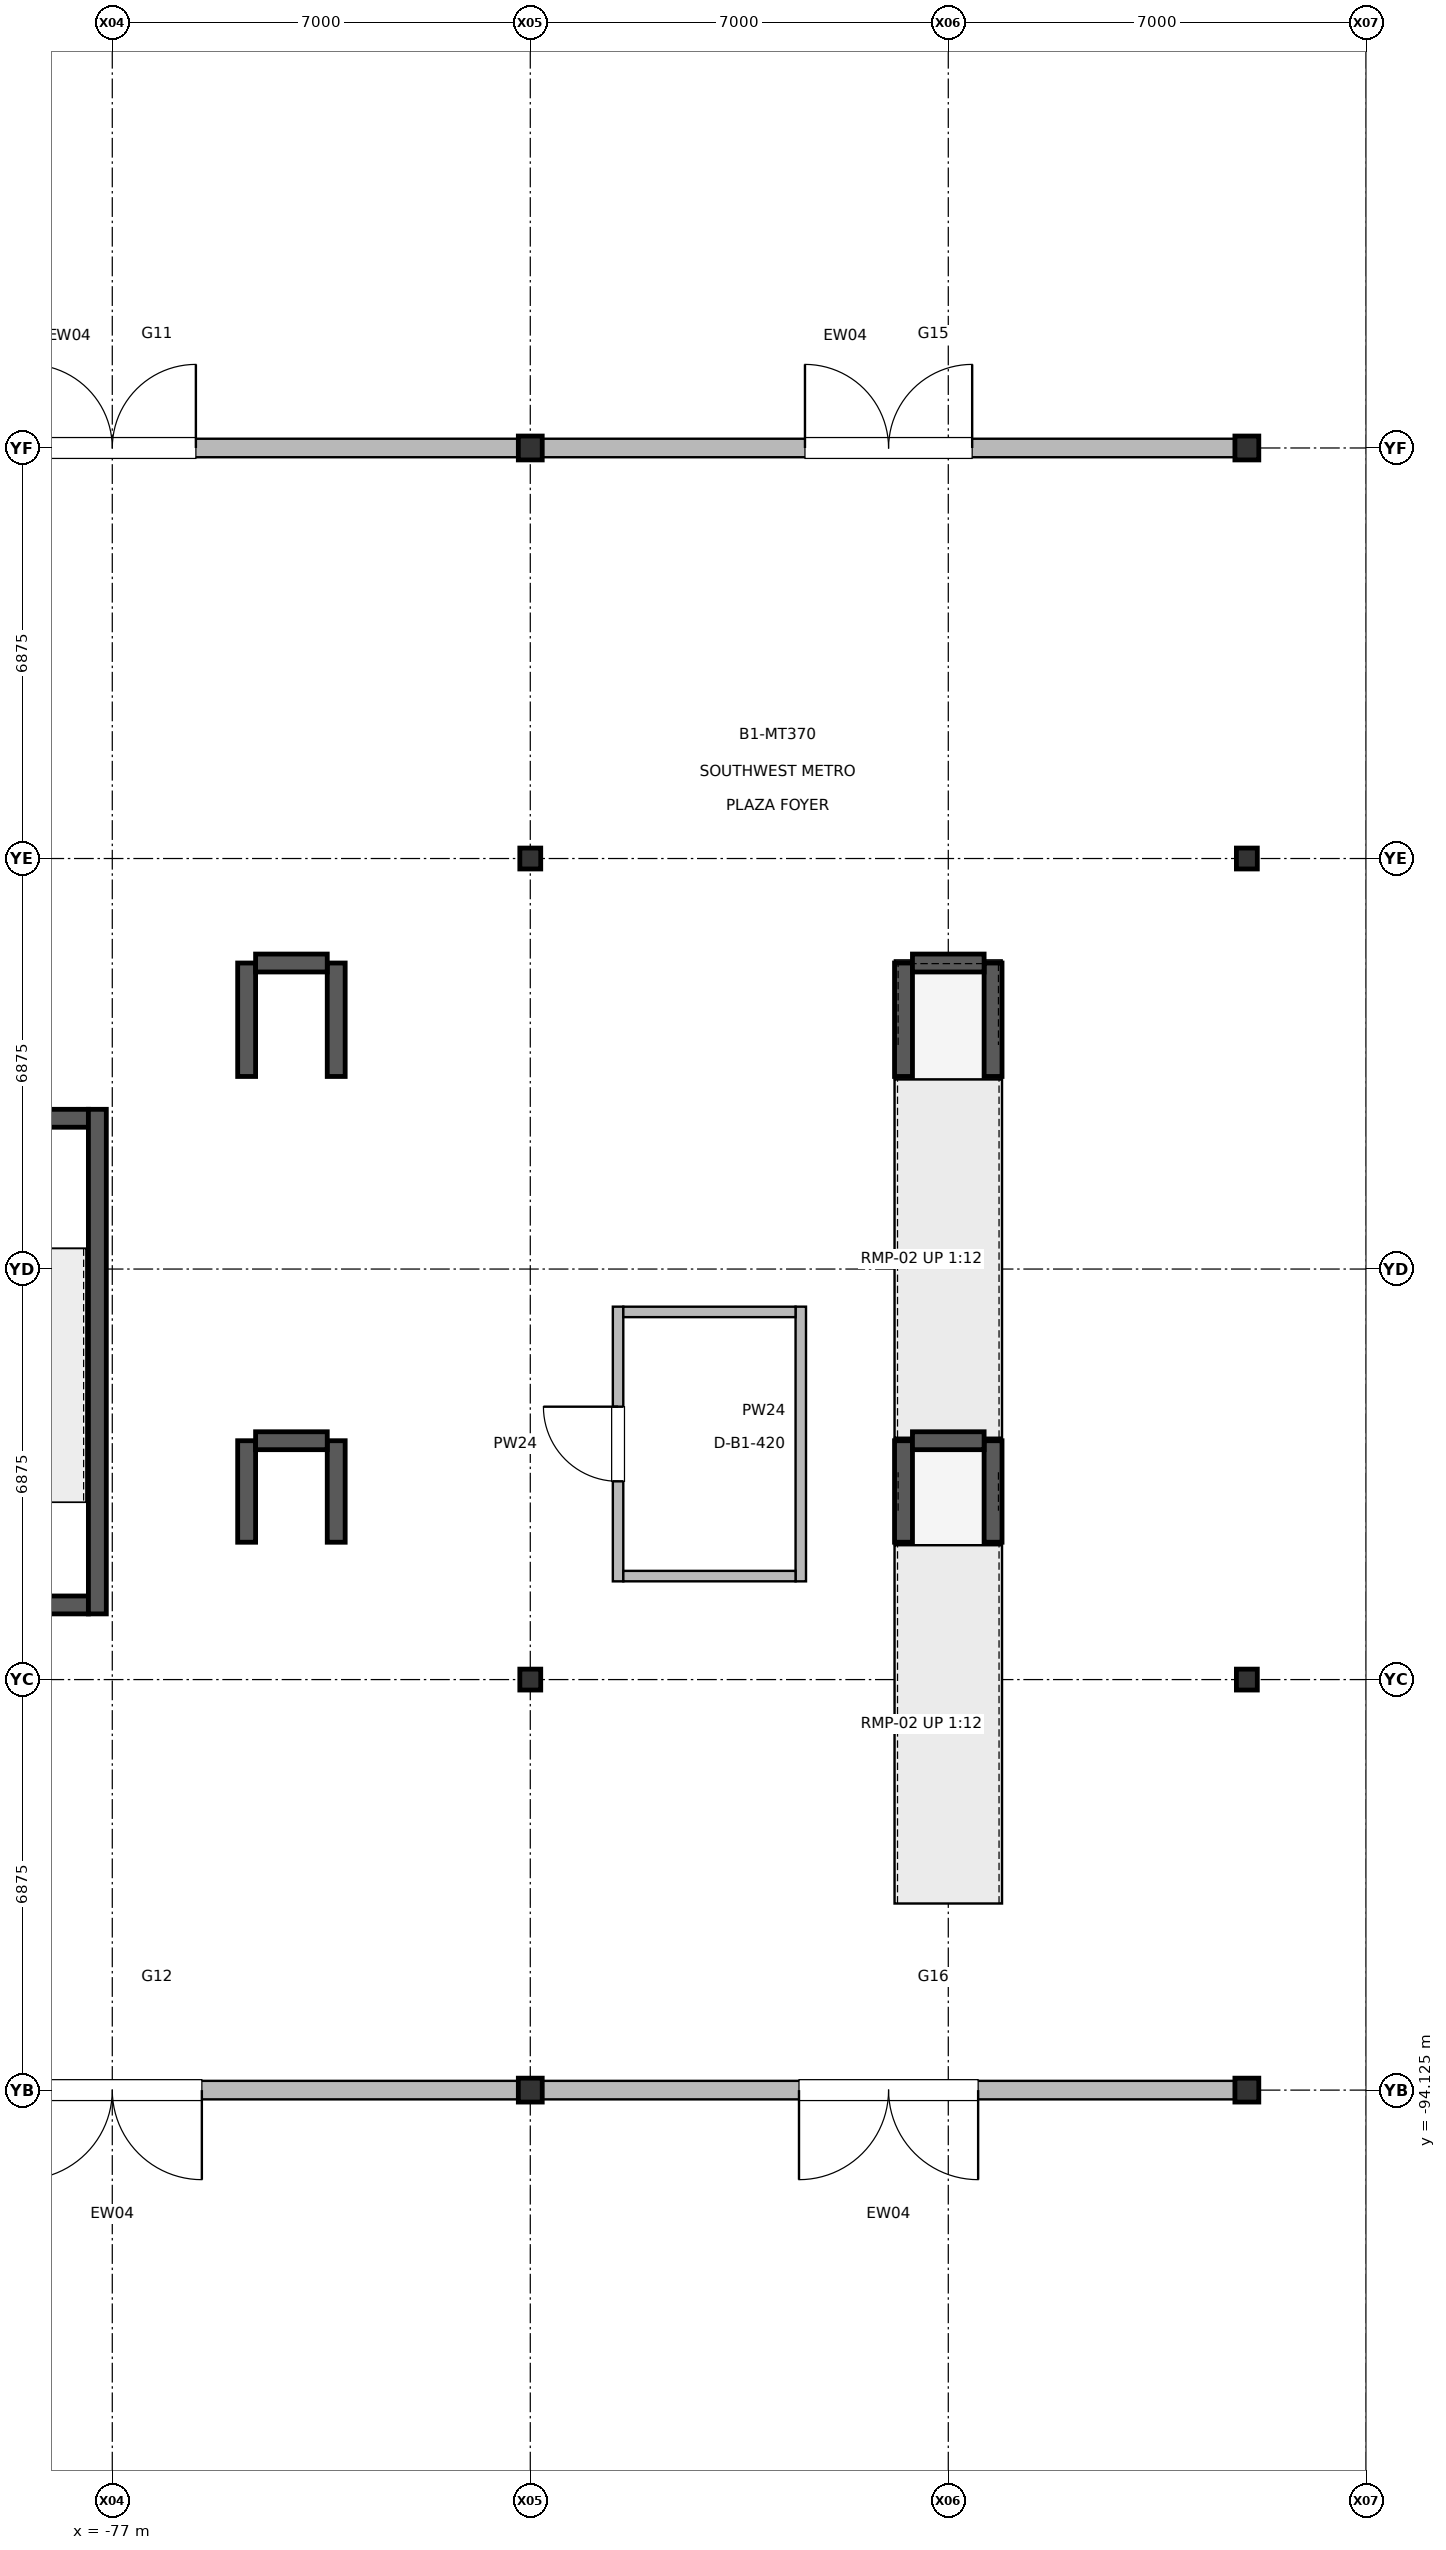
"""IFC4 building model, lengths in metres.
Left out: names, types, materials, properties, quantities, classifications, styles, units other than length and angle.
Written with IfcOpenShell. Run it as: python <this file> out.ifc"""

import sys

from ifc_helpers import new_model, si_unit, direction, frame, frame_2d, origin, origin_2d, place, context, subcontext, project, spatial, rectangle, i_section, extrude, element, fill, save


model = new_model("IFC4")
c1 = context("Model", 3, precision=1e-05, world=origin(), true_north=direction((0.0, 1.0)))
c2 = subcontext(c1, "Body", "Model", "MODEL_VIEW")
j1 = project(units=[si_unit("LENGTHUNIT", "METRE"), si_unit("PLANEANGLEUNIT", "RADIAN")], contexts=[c1])
p1 = place(None, origin())
s1 = spatial("IfcSite", under=j1, at=p1, CompositionType="ELEMENT")
p2 = place(p1, origin())
s2 = spatial("IfcBuilding", under=s1, at=p2, CompositionType="ELEMENT")
p3 = place(p2, frame((0.0, 0.0, -6.0)))
s3 = spatial("IfcBuildingStorey", under=s2, at=p3, CompositionType="ELEMENT", Elevation=-6.0)
p4 = place(p3, frame((-70.0, -94.125, 0.0), z_axis=(0.0, 0.0, 1.0), x_axis=(1.0, 0.0, 0.0)))
e1 = element("IfcColumn", 1, at=p4, inside=s3, PredefinedType="COLUMN", context=c2, shape_type="SweptSolid", body=[
    extrude(i_section(OverallWidth=0.4, OverallDepth=0.4, WebThickness=0.013, FlangeThickness=0.021, at=origin_2d()), origin(), (0.0, 0.0, 1.0), 5.998),
])
for number, where, z_axis, x_axis in (
    (2, (-70.0, -87.25, 0.0), (0.0, 0.0, 1.0), (1.0, 0.0, 0.0)),
    (3, (-70.0, -73.5, 0.0), (0.0, 0.0, 1.0), (1.0, 0.0, 0.0)),
):
    element("IfcColumn", number, at=place(p3, frame(where, z_axis=z_axis, x_axis=x_axis)), inside=s3, PredefinedType="COLUMN", context=c2, shape_type="SweptSolid", body=[
        extrude(i_section(OverallWidth=0.35, OverallDepth=0.35, WebThickness=0.012, FlangeThickness=0.019, at=origin_2d()), origin(), (0.0, 0.0, 1.0), 5.998),
    ])
for number, where, z_axis, x_axis in (
    (4, (-70.0, -66.625, 0.0), (0.0, 0.0, 1.0), (1.0, 0.0, 0.0)),
    (5, (-58.0, -94.125, 0.0), (0.0, 0.0, 1.0), (1.0, 0.0, 0.0)),
):
    element("IfcColumn", number, at=place(p3, frame(where, z_axis=z_axis, x_axis=x_axis)), inside=s3, PredefinedType="COLUMN", context=c2, shape_type="SweptSolid", body=[
        extrude(i_section(OverallWidth=0.4, OverallDepth=0.4, WebThickness=0.013, FlangeThickness=0.021, at=origin_2d()), origin(), (0.0, 0.0, 1.0), 5.998),
    ])
for number, where, z_axis, x_axis in (
    (6, (-58.0, -87.25, 0.0), (0.0, 0.0, 1.0), (1.0, 0.0, 0.0)),
    (7, (-58.0, -73.5, 0.0), (0.0, 0.0, 1.0), (1.0, 0.0, 0.0)),
):
    element("IfcColumn", number, at=place(p3, frame(where, z_axis=z_axis, x_axis=x_axis)), inside=s3, PredefinedType="COLUMN", context=c2, shape_type="SweptSolid", body=[
        extrude(i_section(OverallWidth=0.35, OverallDepth=0.35, WebThickness=0.012, FlangeThickness=0.019, at=origin_2d()), origin(), (0.0, 0.0, 1.0), 5.998),
    ])
p5 = place(p3, frame((-58.0, -66.625, 0.0), z_axis=(0.0, 0.0, 1.0), x_axis=(1.0, 0.0, 0.0)))
e8 = element("IfcColumn", 8, at=p5, inside=s3, PredefinedType="COLUMN", context=c2, shape_type="SweptSolid", body=[
    extrude(i_section(OverallWidth=0.4, OverallDepth=0.4, WebThickness=0.013, FlangeThickness=0.021, at=origin_2d()), origin(), (0.0, 0.0, 1.0), 5.998),
])
p6 = place(p3, frame((-83.81, -66.625, 0.0), z_axis=(0.0, 0.0, 1.0), x_axis=(1.0, 0.0, 0.0)))
e9 = element("IfcWall", 9, at=p6, inside=s3, PredefinedType="SOLIDWALL", context=c2, shape_type="SweptSolid", body=[
    extrude(rectangle(XDim=13.62, YDim=0.31, at=frame_2d((6.81, 0.0))), origin(), (0.0, 0.0, 1.0), 4.655),
])
p7 = place(p6, frame((5.41, 0.0, 0.0)))
e10 = element("IfcOpeningElement", 10, at=p7, cuts=e9, PredefinedType="OPENING", context=c2, shape_type="SweptSolid", body=[
    extrude(rectangle(XDim=2.8, YDim=2.6, at=frame_2d((1.4, 1.3))), frame((0.0, 0.165, 0.0), z_axis=(0.0, -1.0, 0.0), x_axis=(1.0, 0.0, 0.0)), (0.0, 0.0, 1.0), 0.33),
])
p8 = place(p3, frame((-70.19, -94.125, 0.0), z_axis=(0.0, 0.0, 1.0), x_axis=(-1.0, 0.0, 0.0)))
e11 = element("IfcWall", 11, at=p8, inside=s3, PredefinedType="SOLIDWALL", context=c2, shape_type="SweptSolid", body=[
    extrude(rectangle(XDim=13.62, YDim=0.31, at=frame_2d((6.81, 0.0))), origin(), (0.0, 0.0, 1.0), 4.155),
])
p9 = place(p8, frame((5.31, 0.0, 0.0)))
e12 = element("IfcOpeningElement", 12, at=p9, cuts=e11, PredefinedType="OPENING", context=c2, shape_type="SweptSolid", body=[
    extrude(rectangle(XDim=3.0, YDim=2.65, at=frame_2d((1.5, 1.325))), frame((0.0, 0.165, 0.0), z_axis=(0.0, -1.0, 0.0), x_axis=(1.0, 0.0, 0.0)), (0.0, 0.0, 1.0), 0.33),
])
p10 = place(p3, frame((-69.81, -66.625, 0.0), z_axis=(0.0, 0.0, 1.0), x_axis=(1.0, 0.0, 0.0)))
e13 = element("IfcWall", 13, at=p10, inside=s3, PredefinedType="SOLIDWALL", context=c2, shape_type="SweptSolid", body=[
    extrude(rectangle(XDim=11.62, YDim=0.31, at=frame_2d((5.81, 0.0))), origin(), (0.0, 0.0, 1.0), 4.555),
])
p11 = place(p10, frame((4.41, 0.0, 0.0)))
e14 = element("IfcOpeningElement", 14, at=p11, cuts=e13, PredefinedType="OPENING", context=c2, shape_type="SweptSolid", body=[
    extrude(rectangle(XDim=2.8, YDim=2.6, at=frame_2d((1.4, 1.3))), frame((0.0, 0.165, 0.0), z_axis=(0.0, -1.0, 0.0), x_axis=(1.0, 0.0, 0.0)), (0.0, 0.0, 1.0), 0.33),
])
p12 = place(p3, frame((-58.19, -94.125, 0.0), z_axis=(0.0, 0.0, 1.0), x_axis=(-1.0, 0.0, 0.0)))
e15 = element("IfcWall", 15, at=p12, inside=s3, PredefinedType="SOLIDWALL", context=c2, shape_type="SweptSolid", body=[
    extrude(rectangle(XDim=11.62, YDim=0.31, at=frame_2d((5.81, 0.0))), origin(), (0.0, 0.0, 1.0), 4.155),
])
p13 = place(p12, frame((4.31, 0.0, 0.0)))
e16 = element("IfcOpeningElement", 16, at=p13, cuts=e15, PredefinedType="OPENING", context=c2, shape_type="SweptSolid", body=[
    extrude(rectangle(XDim=3.0, YDim=2.65, at=frame_2d((1.5, 1.325))), frame((0.0, 0.165, 0.0), z_axis=(0.0, -1.0, 0.0), x_axis=(1.0, 0.0, 0.0)), (0.0, 0.0, 1.0), 0.33),
])
p14 = place(p3, frame((-68.53, -85.605, 0.0), z_axis=(0.0, 0.0, 1.0), x_axis=(0.0, 1.0, 0.0)))
e17 = element("IfcWall", 17, at=p14, inside=s3, PredefinedType="PARTITIONING", context=c2, shape_type="SweptSolid", body=[
    extrude(rectangle(XDim=4.6, YDim=0.175, at=frame_2d((2.3, 0.0))), origin(), (0.0, 0.0, 1.0), 5.02),
])
p15 = place(p14, frame((1.675, 0.0, 0.0)))
e18 = element("IfcOpeningElement", 18, at=p15, cuts=e17, PredefinedType="OPENING", context=c2, shape_type="SweptSolid", body=[
    extrude(rectangle(XDim=1.25, YDim=2.2, at=frame_2d((0.625, 1.1))), frame((0.0, 0.097, 0.0), z_axis=(0.0, -1.0, 0.0), x_axis=(1.0, 0.0, 0.0)), (0.0, 0.0, 1.0), 0.195),
])
p16 = place(p3, frame((-65.47, -85.605, 0.0), z_axis=(0.0, 0.0, 1.0), x_axis=(0.0, 1.0, 0.0)))
e19 = element("IfcWall", 19, at=p16, inside=s3, PredefinedType="PARTITIONING", context=c2, shape_type="SweptSolid", body=[
    extrude(rectangle(XDim=4.6, YDim=0.175, at=frame_2d((2.3, 0.0))), origin(), (0.0, 0.0, 1.0), 5.02),
])
for number, where, z_axis, x_axis in (
    (20, (-68.442, -85.517, 0.0), (0.0, 0.0, 1.0), (1.0, 0.0, 0.0)),
    (21, (-68.442, -81.093, 0.0), (0.0, 0.0, 1.0), (1.0, 0.0, 0.0)),
):
    element("IfcWall", number, at=place(p3, frame(where, z_axis=z_axis, x_axis=x_axis)), inside=s3, PredefinedType="PARTITIONING", context=c2, shape_type="SweptSolid", body=[
        extrude(rectangle(XDim=2.884, YDim=0.175, at=frame_2d((1.442, 0.0))), origin(), (0.0, 0.0, 1.0), 5.02),
    ])
p17 = place(p3, frame((-81.6, -86.0, 0.0), z_axis=(0.0, 0.0, 1.0), x_axis=(1.0, 0.0, 0.0)))
e22 = element("IfcWall", 22, at=p17, inside=s3, PredefinedType="SHEAR", context=c2, shape_type="SweptSolid", body=[
    extrude(rectangle(XDim=4.2, YDim=0.3, at=frame_2d((2.1, 0.0))), origin(), (0.0, 0.0, 1.0), 5.78),
])
p18 = place(p17, frame((1.375, 0.0, 0.0)))
e23 = element("IfcOpeningElement", 23, at=p18, cuts=e22, PredefinedType="OPENING", context=c2, shape_type="SweptSolid", body=[
    extrude(rectangle(XDim=1.45, YDim=2.2, at=frame_2d((0.725, 1.1))), frame((0.0, 0.16, 0.0), z_axis=(0.0, -1.0, 0.0), x_axis=(1.0, 0.0, 0.0)), (0.0, 0.0, 1.0), 0.32),
])
p19 = place(p3, frame((-81.6, -77.85, 0.0), z_axis=(0.0, 0.0, 1.0), x_axis=(1.0, 0.0, 0.0)))
e24 = element("IfcWall", 24, at=p19, inside=s3, PredefinedType="SHEAR", context=c2, shape_type="SweptSolid", body=[
    extrude(rectangle(XDim=4.2, YDim=0.3, at=frame_2d((2.1, 0.0))), origin(), (0.0, 0.0, 1.0), 5.78),
])
p20 = place(p3, frame((-77.25, -86.15, 0.0), z_axis=(0.0, 0.0, 1.0), x_axis=(0.0, 1.0, 0.0)))
e25 = element("IfcWall", 25, at=p20, inside=s3, PredefinedType="SHEAR", context=c2, shape_type="SweptSolid", body=[
    extrude(rectangle(XDim=8.45, YDim=0.3, at=frame_2d((4.225, 0.0))), origin(), (0.0, 0.0, 1.0), 5.78),
])
for number, where, z_axis, x_axis in (
    (26, (-63.75, -84.95, 0.0), (0.0, 0.0, 1.0), (0.0, 1.0, 0.0)),
    (27, (-62.25, -84.95, 0.0), (0.0, 0.0, 1.0), (0.0, 1.0, 0.0)),
):
    element("IfcWall", number, at=place(p3, frame(where, z_axis=z_axis, x_axis=x_axis)), inside=s3, PredefinedType="SHEAR", context=c2, shape_type="SweptSolid", body=[
        extrude(rectangle(XDim=1.7, YDim=0.3, at=frame_2d((0.85, 0.0))), origin(), (0.0, 0.0, 1.0), 0.3),
    ])
p21 = place(p3, frame((-63.6, -83.25, 0.0), z_axis=(0.0, 0.0, 1.0), x_axis=(1.0, 0.0, 0.0)))
e28 = element("IfcWall", 28, at=p21, inside=s3, PredefinedType="SHEAR", context=c2, shape_type="SweptSolid", body=[
    extrude(rectangle(XDim=1.2, YDim=0.3, at=frame_2d((0.6, 0.0))), origin(), (0.0, 0.0, 1.0), 0.3),
])
for number, where, z_axis, x_axis in (
    (29, (-63.75, -77.15, 0.0), (0.0, 0.0, 1.0), (0.0, 1.0, 0.0)),
    (30, (-62.25, -77.15, 0.0), (0.0, 0.0, 1.0), (0.0, 1.0, 0.0)),
):
    element("IfcWall", number, at=place(p3, frame(where, z_axis=z_axis, x_axis=x_axis)), inside=s3, PredefinedType="SHEAR", context=c2, shape_type="SweptSolid", body=[
        extrude(rectangle(XDim=1.9, YDim=0.3, at=frame_2d((0.95, 0.0))), origin(), (0.0, 0.0, 1.0), 0.8),
    ])
p22 = place(p3, frame((-63.6, -75.25, 0.0), z_axis=(0.0, 0.0, 1.0), x_axis=(1.0, 0.0, 0.0)))
e31 = element("IfcWall", 31, at=p22, inside=s3, PredefinedType="SHEAR", context=c2, shape_type="SweptSolid", body=[
    extrude(rectangle(XDim=1.2, YDim=0.3, at=frame_2d((0.6, 0.0))), origin(), (0.0, 0.0, 1.0), 0.8),
])
for number, where, z_axis, x_axis in (
    (32, (-74.75, -84.95, 0.0), (0.0, 0.0, 1.0), (0.0, 1.0, 0.0)),
    (33, (-73.25, -84.95, 0.0), (0.0, 0.0, 1.0), (0.0, 1.0, 0.0)),
):
    element("IfcWall", number, at=place(p3, frame(where, z_axis=z_axis, x_axis=x_axis)), inside=s3, PredefinedType="SHEAR", context=c2, shape_type="SweptSolid", body=[
        extrude(rectangle(XDim=1.7, YDim=0.3, at=frame_2d((0.85, 0.0))), origin(), (0.0, 0.0, 1.0), 5.78),
    ])
p23 = place(p3, frame((-74.6, -83.25, 0.0), z_axis=(0.0, 0.0, 1.0), x_axis=(1.0, 0.0, 0.0)))
e34 = element("IfcWall", 34, at=p23, inside=s3, PredefinedType="SHEAR", context=c2, shape_type="SweptSolid", body=[
    extrude(rectangle(XDim=1.2, YDim=0.3, at=frame_2d((0.6, 0.0))), origin(), (0.0, 0.0, 1.0), 5.78),
])
for number, where, z_axis, x_axis in (
    (35, (-74.75, -77.15, 0.0), (0.0, 0.0, 1.0), (0.0, 1.0, 0.0)),
    (36, (-73.25, -77.15, 0.0), (0.0, 0.0, 1.0), (0.0, 1.0, 0.0)),
):
    element("IfcWall", number, at=place(p3, frame(where, z_axis=z_axis, x_axis=x_axis)), inside=s3, PredefinedType="SHEAR", context=c2, shape_type="SweptSolid", body=[
        extrude(rectangle(XDim=1.9, YDim=0.3, at=frame_2d((0.95, 0.0))), origin(), (0.0, 0.0, 1.0), 5.78),
    ])
p24 = place(p3, frame((-74.6, -75.25, 0.0), z_axis=(0.0, 0.0, 1.0), x_axis=(1.0, 0.0, 0.0)))
e37 = element("IfcWall", 37, at=p24, inside=s3, PredefinedType="SHEAR", context=c2, shape_type="SweptSolid", body=[
    extrude(rectangle(XDim=1.2, YDim=0.3, at=frame_2d((0.6, 0.0))), origin(), (0.0, 0.0, 1.0), 5.78),
])
p25 = place(p7, origin())
e38 = element("IfcDoor", 38, at=p25, inside=s3, OperationType="DOUBLE_DOOR_SINGLE_SWING", PredefinedType="DOOR", context=c2, shape_type="SweptSolid", body=[
    extrude(rectangle(XDim=2.8, YDim=2.6, at=frame_2d((1.4, 1.3))), frame((0.0, 0.025, 0.0), z_axis=(0.0, -1.0, 0.0), x_axis=(1.0, 0.0, 0.0)), (0.0, 0.0, 1.0), 0.05),
])
fill(e10, e38)
p26 = place(p9, origin())
e39 = element("IfcDoor", 39, at=p26, inside=s3, OperationType="DOUBLE_DOOR_SINGLE_SWING", PredefinedType="DOOR", context=c2, shape_type="SweptSolid", body=[
    extrude(rectangle(XDim=3.0, YDim=2.65, at=frame_2d((1.5, 1.325))), frame((0.0, 0.025, 0.0), z_axis=(0.0, -1.0, 0.0), x_axis=(1.0, 0.0, 0.0)), (0.0, 0.0, 1.0), 0.05),
])
fill(e12, e39)
p27 = place(p11, origin())
e40 = element("IfcDoor", 40, at=p27, inside=s3, OperationType="DOUBLE_DOOR_SINGLE_SWING", PredefinedType="DOOR", context=c2, shape_type="SweptSolid", body=[
    extrude(rectangle(XDim=2.8, YDim=2.6, at=frame_2d((1.4, 1.3))), frame((0.0, 0.025, 0.0), z_axis=(0.0, -1.0, 0.0), x_axis=(1.0, 0.0, 0.0)), (0.0, 0.0, 1.0), 0.05),
])
fill(e14, e40)
p28 = place(p13, origin())
e41 = element("IfcDoor", 41, at=p28, inside=s3, OperationType="DOUBLE_DOOR_SINGLE_SWING", PredefinedType="DOOR", context=c2, shape_type="SweptSolid", body=[
    extrude(rectangle(XDim=3.0, YDim=2.65, at=frame_2d((1.5, 1.325))), frame((0.0, 0.025, 0.0), z_axis=(0.0, -1.0, 0.0), x_axis=(1.0, 0.0, 0.0)), (0.0, 0.0, 1.0), 0.05),
])
fill(e16, e41)
p29 = place(p15, origin())
e42 = element("IfcDoor", 42, at=p29, inside=s3, OperationType="SINGLE_SWING_RIGHT", PredefinedType="DOOR", context=c2, shape_type="SweptSolid", body=[
    extrude(rectangle(XDim=1.25, YDim=2.2, at=frame_2d((0.625, 1.1))), frame((0.0, 0.025, 0.0), z_axis=(0.0, -1.0, 0.0), x_axis=(1.0, 0.0, 0.0)), (0.0, 0.0, 1.0), 0.05),
])
fill(e18, e42)
save(model, sys.argv[1])
